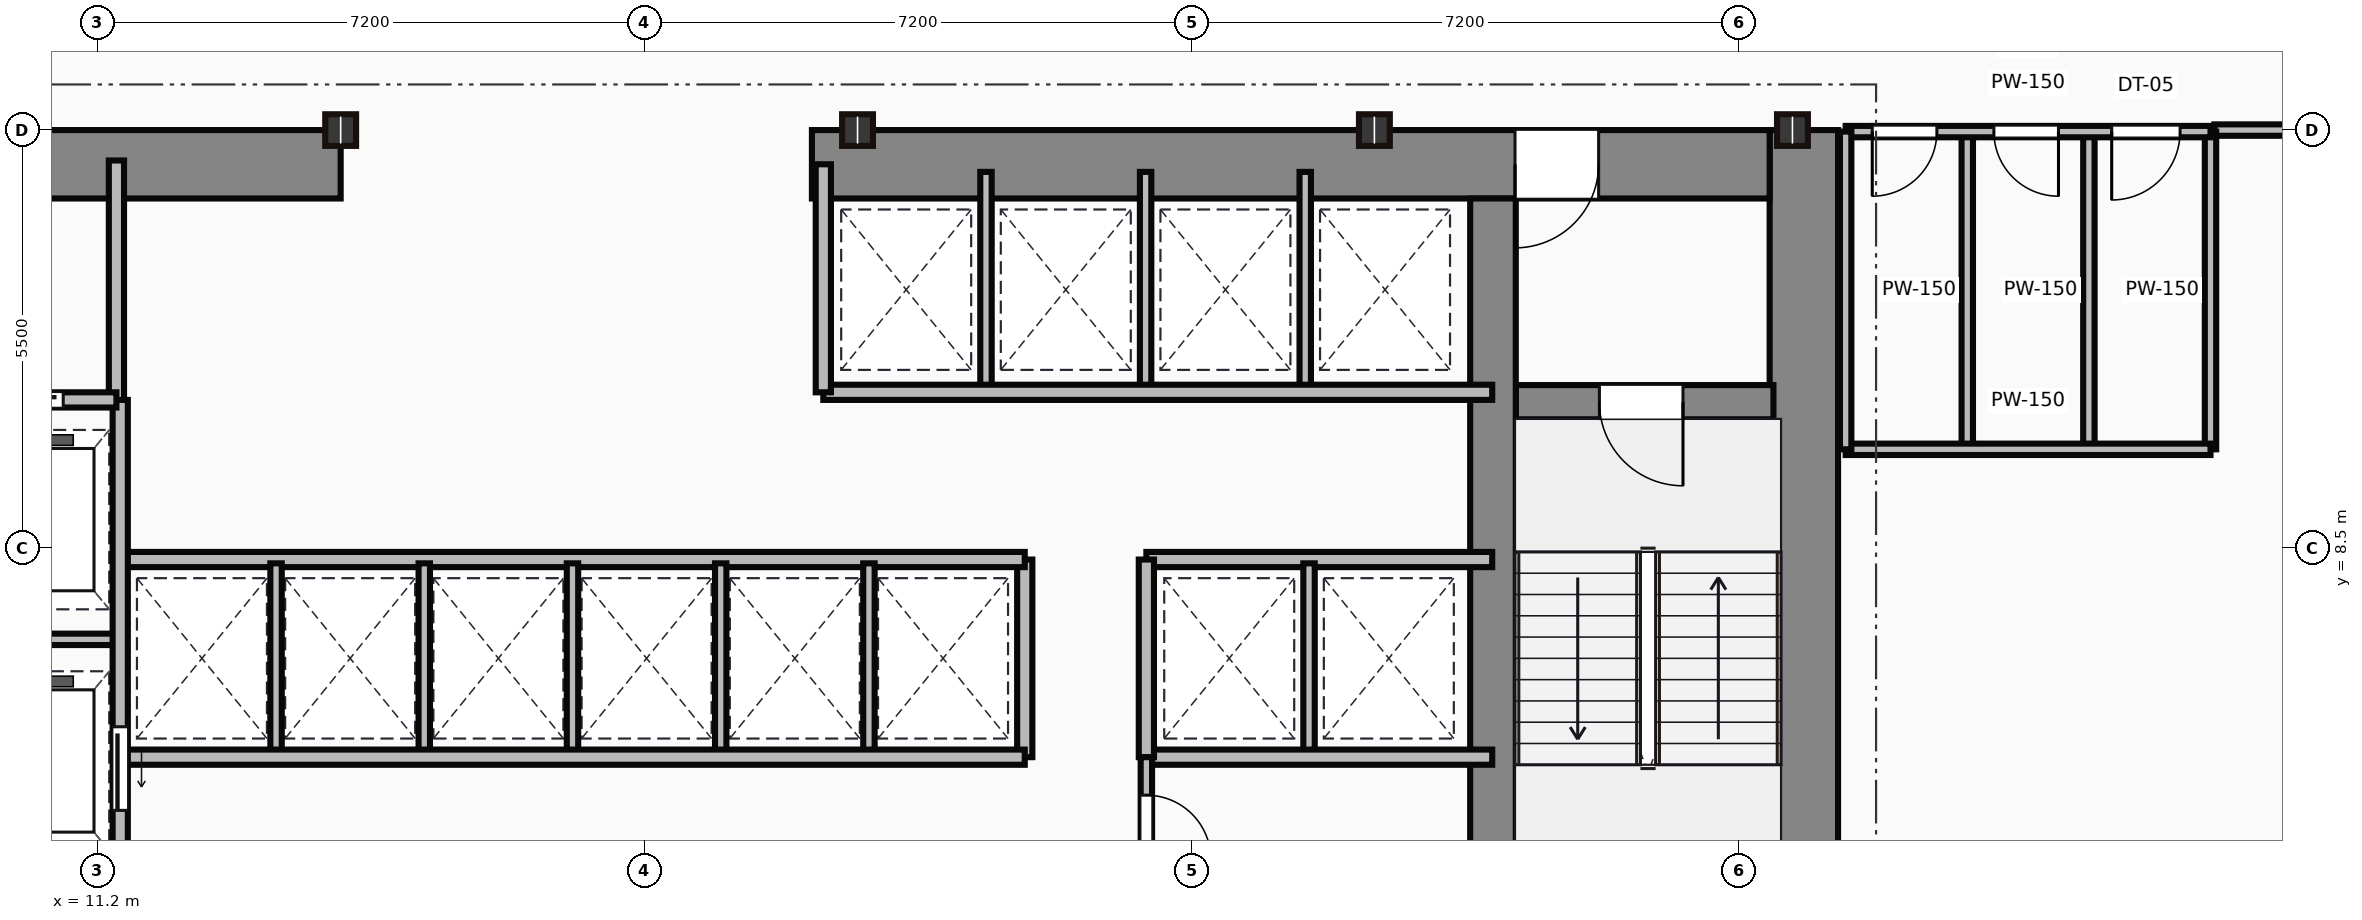
"""IFC4 building model, lengths in metres.
Left out: names, types, materials, properties, quantities, classifications, styles, units other than length and angle.
Written with IfcOpenShell. Run it as: python <this file> out.ifc"""

import sys

from ifc_helpers import new_model, si_unit, direction, frame, frame_2d, origin, origin_2d, place, context, subcontext, project, spatial, rectangle, i_section, extrude, source, transform, mapped, element, fill, save


model = new_model("IFC4")
c1 = context("Model", 3, precision=1e-05, world=origin(), true_north=direction((0.0, 1.0)))
c2 = subcontext(c1, "Body", "Model", "MODEL_VIEW")
j1 = project(units=[si_unit("LENGTHUNIT", "METRE"), si_unit("PLANEANGLEUNIT", "RADIAN")], contexts=[c1])
p1 = place(None, origin())
s1 = spatial("IfcSite", under=j1, at=p1, CompositionType="ELEMENT")
p2 = place(p1, origin())
s2 = spatial("IfcBuilding", under=s1, at=p2, CompositionType="ELEMENT")
p3 = place(p2, frame((0.0, 0.0, 54.4)))
s3 = spatial("IfcBuildingStorey", under=s2, at=p3, CompositionType="ELEMENT", Elevation=54.4)
m1 = source(origin(), c2, "Body", "SweptSolid", [
    extrude(rectangle(XDim=13.1, YDim=0.9, at=frame_2d((6.55, 0.0))), origin(), (0.0, 0.0, 1.0), 3.65),
])
p4 = place(p3, frame((33.65, 0.9, 0.0), z_axis=(0.0, 0.0, 1.0), x_axis=(0.0, 1.0, 0.0)))
e1 = element("IfcWall", 1, at=p4, inside=s3, PredefinedType="SHEAR", context=c2, shape_type="MappedRepresentation", body=[
    mapped(m1, transform((0.0, 0.0, 0.0))),
])
m2 = source(origin(), c2, "Body", "SweptSolid", [
    extrude(rectangle(XDim=9.1, YDim=0.9, at=frame_2d((4.55, 0.0))), origin(), (0.0, 0.0, 1.0), 3.65),
])
p5 = place(p3, frame((5.3, 13.55, 0.0), z_axis=(0.0, 0.0, 1.0), x_axis=(1.0, 0.0, 0.0)))
e2 = element("IfcWall", 2, at=p5, inside=s3, PredefinedType="SHEAR", context=c2, shape_type="MappedRepresentation", body=[
    mapped(m2, transform((0.0, 0.0, 0.0))),
])
p6 = place(p5, frame((4.1, 0.0, 0.0)))
e3 = element("IfcOpeningElement", 3, at=p6, cuts=e2, PredefinedType="OPENING", context=c2, shape_type="SweptSolid", body=[
    extrude(rectangle(XDim=1.1, YDim=2.15, at=frame_2d((0.55, 1.075))), frame((0.0, 0.46, 0.0), z_axis=(0.0, -1.0, 0.0), x_axis=(1.0, 0.0, 0.0)), (0.0, 0.0, 1.0), 0.92),
])
m3 = source(origin(), c2, "Body", "SweptSolid", [
    extrude(rectangle(XDim=12.6, YDim=0.9, at=frame_2d((6.3, 0.0))), origin(), (0.0, 0.0, 1.0), 3.65),
])
p7 = place(p3, frame((20.6, 13.55, 0.0), z_axis=(0.0, 0.0, 1.0), x_axis=(1.0, 0.0, 0.0)))
e4 = element("IfcWall", 4, at=p7, inside=s3, PredefinedType="SHEAR", context=c2, shape_type="MappedRepresentation", body=[
    mapped(m3, transform((0.0, 0.0, 0.0))),
])
p8 = place(p7, frame((9.25, 0.0, 0.0)))
e5 = element("IfcOpeningElement", 5, at=p8, cuts=e4, PredefinedType="OPENING", context=c2, shape_type="SweptSolid", body=[
    extrude(rectangle(XDim=1.1, YDim=2.15, at=frame_2d((0.55, 1.075))), frame((0.0, 0.46, 0.0), z_axis=(0.0, -1.0, 0.0), x_axis=(1.0, 0.0, 0.0)), (0.0, 0.0, 1.0), 0.92),
])
m4 = source(origin(), c2, "Body", "SweptSolid", [
    extrude(rectangle(XDim=12.2, YDim=0.6, at=frame_2d((6.1, 0.0))), origin(), (0.0, 0.0, 1.0), 3.65),
])
p9 = place(p3, frame((29.56, 0.9, 0.0), z_axis=(0.0, 0.0, 1.0), x_axis=(0.0, 1.0, 0.0)))
e6 = element("IfcWall", 6, at=p9, inside=s3, PredefinedType="SHEAR", context=c2, shape_type="MappedRepresentation", body=[
    mapped(m4, transform((0.0, 0.0, 0.0))),
])
m5 = source(origin(), c2, "Body", "SweptSolid", [
    extrude(rectangle(XDim=3.39, YDim=0.45, at=frame_2d((1.695, 0.0))), origin(), (0.0, 0.0, 1.0), 3.65),
])
p10 = place(p3, frame((29.86, 10.42, 0.0), z_axis=(0.0, 0.0, 1.0), x_axis=(1.0, 0.0, 0.0)))
e7 = element("IfcWall", 7, at=p10, inside=s3, PredefinedType="SHEAR", context=c2, shape_type="MappedRepresentation", body=[
    mapped(m5, transform((0.0, 0.0, 0.0))),
])
p11 = place(p10, frame((1.1, 0.0, 0.0)))
e8 = element("IfcOpeningElement", 8, at=p11, cuts=e7, PredefinedType="OPENING", context=c2, shape_type="SweptSolid", body=[
    extrude(rectangle(XDim=1.1, YDim=2.15, at=frame_2d((0.55, 1.075))), frame((0.0, 0.235, 0.0), z_axis=(0.0, -1.0, 0.0), x_axis=(1.0, 0.0, 0.0)), (0.0, 0.0, 1.0), 0.47),
])
m6 = source(origin(), c2, "Body", "SweptSolid", [
    extrude(i_section(OverallWidth=0.406, OverallDepth=0.416, WebThickness=0.03, FlangeThickness=0.048, at=origin_2d()), origin(), (0.0, 0.0, 1.0), 3.65),
])
for number, where, z_axis, x_axis in (
    (9, (14.4, 14.0, 0.0), (0.0, 0.0, 1.0), (1.0, 0.0, 0.0)),
    (10, (21.2, 14.0, 0.0), (0.0, 0.0, 1.0), (1.0, 0.0, 0.0)),
    (11, (28.0, 14.0, 0.0), (0.0, 0.0, 1.0), (1.0, 0.0, 0.0)),
    (12, (33.5, 14.0, 0.0), (0.0, 0.0, 1.0), (1.0, 0.0, 0.0)),
):
    element("IfcColumn", number, at=place(p3, frame(where, z_axis=z_axis, x_axis=x_axis)), inside=s3, PredefinedType="COLUMN", context=c2, shape_type="MappedRepresentation", body=[
        mapped(m6, transform((0.0, 0.0, 0.0))),
    ])
m7 = source(origin(), c2, "Body", "SweptSolid", [
    extrude(rectangle(XDim=3.18, YDim=0.2, at=frame_2d((1.59, 0.0))), origin(), (0.0, 0.0, 1.0), 3.4),
])
p12 = place(p3, frame((11.45, 10.42, 0.0), z_axis=(0.0, 0.0, 1.0), x_axis=(0.0, 1.0, 0.0)))
e13 = element("IfcWall", 13, at=p12, inside=s3, PredefinedType="PARTITIONING", context=c2, shape_type="MappedRepresentation", body=[
    mapped(m7, transform((0.0, 0.0, 0.0))),
])
m8 = source(origin(), c2, "Body", "SweptSolid", [
    extrude(rectangle(XDim=2.35, YDim=0.2, at=frame_2d((1.175, 0.0))), origin(), (0.0, 0.0, 1.0), 3.4),
])
p13 = place(p3, frame((9.1, 10.45, 0.0), z_axis=(0.0, 0.0, 1.0), x_axis=(1.0, 0.0, 0.0)))
e14 = element("IfcWall", 14, at=p13, inside=s3, PredefinedType="PARTITIONING", context=c2, shape_type="MappedRepresentation", body=[
    mapped(m8, transform((0.0, 0.0, 0.0))),
])
p14 = place(p13, frame((0.55, 0.0, 0.0)))
e15 = element("IfcOpeningElement", 15, at=p14, cuts=e14, PredefinedType="OPENING", context=c2, shape_type="SweptSolid", body=[
    extrude(rectangle(XDim=1.1, YDim=2.15, at=frame_2d((0.55, 1.075))), frame((0.0, 0.11, 0.0), z_axis=(0.0, -1.0, 0.0), x_axis=(1.0, 0.0, 0.0)), (0.0, 0.0, 1.0), 0.22),
])
m9 = source(origin(), c2, "Body", "SweptSolid", [
    extrude(rectangle(XDim=9.6, YDim=0.2, at=frame_2d((4.8, 0.0))), origin(), (0.0, 0.0, 1.0), 3.4),
])
p15 = place(p3, frame((11.5, 0.85, 0.0), z_axis=(0.0, 0.0, 1.0), x_axis=(0.0, 1.0, 0.0)))
e16 = element("IfcWall", 16, at=p15, inside=s3, PredefinedType="PARTITIONING", context=c2, shape_type="MappedRepresentation", body=[
    mapped(m9, transform((0.0, 0.0, 0.0))),
])
p16 = place(p15, frame((4.2, 0.0, 0.0)))
e17 = element("IfcOpeningElement", 17, at=p16, cuts=e16, PredefinedType="OPENING", context=c2, shape_type="SweptSolid", body=[
    extrude(rectangle(XDim=1.1, YDim=2.15, at=frame_2d((0.55, 1.075))), frame((0.0, 0.11, 0.0), z_axis=(0.0, -1.0, 0.0), x_axis=(1.0, 0.0, 0.0)), (0.0, 0.0, 1.0), 0.22),
])
p17 = place(p15, frame((0.9, 0.0, 0.0)))
e18 = element("IfcOpeningElement", 18, at=p17, cuts=e16, PredefinedType="OPENING", context=c2, shape_type="SweptSolid", body=[
    extrude(rectangle(XDim=1.2, YDim=2.15, at=frame_2d((0.6, 1.075))), frame((0.0, 0.11, 0.0), z_axis=(0.0, -1.0, 0.0), x_axis=(1.0, 0.0, 0.0)), (0.0, 0.0, 1.0), 0.22),
])
m10 = source(origin(), c2, "Body", "SweptSolid", [
    extrude(rectangle(XDim=2.4, YDim=0.15, at=frame_2d((1.2, 0.0))), origin(), (0.0, 0.0, 1.0), 3.4),
])
p18 = place(p3, frame((9.1, 7.3, 0.0), z_axis=(0.0, 0.0, 1.0), x_axis=(1.0, 0.0, 0.0)))
e19 = element("IfcWall", 19, at=p18, inside=s3, PredefinedType="PARTITIONING", context=c2, shape_type="MappedRepresentation", body=[
    mapped(m10, transform((0.0, 0.0, 0.0))),
])
m11 = source(origin(), c2, "Body", "SweptSolid", [
    extrude(rectangle(XDim=11.85, YDim=0.2, at=frame_2d((5.925, 0.0))), origin(), (0.0, 0.0, 1.0), 3.4),
])
for number, where, z_axis, x_axis in (
    (20, (11.55, 5.75, 0.0), (0.0, 0.0, 1.0), (1.0, 0.0, 0.0)),
    (21, (11.55, 8.35, 0.0), (0.0, 0.0, 1.0), (1.0, 0.0, 0.0)),
):
    element("IfcWall", number, at=place(p3, frame(where, z_axis=z_axis, x_axis=x_axis)), inside=s3, PredefinedType="PARTITIONING", context=c2, shape_type="MappedRepresentation", body=[
        mapped(m11, transform((0.0, 0.0, 0.0))),
    ])
m12 = source(origin(), c2, "Body", "SweptSolid", [
    extrude(rectangle(XDim=2.6, YDim=0.2, at=frame_2d((1.3, 0.0))), origin(), (0.0, 0.0, 1.0), 3.4),
])
p19 = place(p3, frame((23.4, 5.75, 0.0), z_axis=(0.0, 0.0, 1.0), x_axis=(0.0, 1.0, 0.0)))
e22 = element("IfcWall", 22, at=p19, inside=s3, PredefinedType="PARTITIONING", context=c2, shape_type="MappedRepresentation", body=[
    mapped(m12, transform((0.0, 0.0, 0.0))),
])
m13 = source(origin(), c2, "Body", "SweptSolid", [
    extrude(rectangle(XDim=2.5, YDim=0.15, at=frame_2d((1.25, 0.0))), origin(), (0.0, 0.0, 1.0), 3.4),
])
for number, where, z_axis, x_axis in (
    (23, (13.55, 5.8, 0.0), (0.0, 0.0, 1.0), (0.0, 1.0, 0.0)),
    (24, (15.5, 5.8, 0.0), (0.0, 0.0, 1.0), (0.0, 1.0, 0.0)),
    (25, (17.45, 5.8, 0.0), (0.0, 0.0, 1.0), (0.0, 1.0, 0.0)),
    (26, (19.4, 5.8, 0.0), (0.0, 0.0, 1.0), (0.0, 1.0, 0.0)),
    (27, (21.35, 5.8, 0.0), (0.0, 0.0, 1.0), (0.0, 1.0, 0.0)),
):
    element("IfcWall", number, at=place(p3, frame(where, z_axis=z_axis, x_axis=x_axis)), inside=s3, PredefinedType="PARTITIONING", context=c2, shape_type="MappedRepresentation", body=[
        mapped(m13, transform((0.0, 0.0, 0.0))),
    ])
m14 = source(origin(), c2, "Body", "SweptSolid", [
    extrude(rectangle(XDim=8.8, YDim=0.2, at=frame_2d((4.4, 0.0))), origin(), (0.0, 0.0, 1.0), 3.4),
])
p20 = place(p3, frame((20.75, 10.55, 0.0), z_axis=(0.0, 0.0, 1.0), x_axis=(1.0, 0.0, 0.0)))
e28 = element("IfcWall", 28, at=p20, inside=s3, PredefinedType="PARTITIONING", context=c2, shape_type="MappedRepresentation", body=[
    mapped(m14, transform((0.0, 0.0, 0.0))),
])
m15 = source(origin(), c2, "Body", "SweptSolid", [
    extrude(rectangle(XDim=3.0, YDim=0.2, at=frame_2d((1.5, 0.0))), origin(), (0.0, 0.0, 1.0), 3.4),
])
p21 = place(p3, frame((20.75, 10.55, 0.0), z_axis=(0.0, 0.0, 1.0), x_axis=(0.0, 1.0, 0.0)))
e29 = element("IfcWall", 29, at=p21, inside=s3, PredefinedType="PARTITIONING", context=c2, shape_type="MappedRepresentation", body=[
    mapped(m15, transform((0.0, 0.0, 0.0))),
])
m16 = source(origin(), c2, "Body", "SweptSolid", [
    extrude(rectangle(XDim=2.85, YDim=0.15, at=frame_2d((1.425, 0.0))), origin(), (0.0, 0.0, 1.0), 3.4),
])
for number, where, z_axis, x_axis in (
    (30, (22.89, 10.6, 0.0), (0.0, 0.0, 1.0), (0.0, 1.0, 0.0)),
    (31, (24.99, 10.6, 0.0), (0.0, 0.0, 1.0), (0.0, 1.0, 0.0)),
    (32, (27.09, 10.6, 0.0), (0.0, 0.0, 1.0), (0.0, 1.0, 0.0)),
):
    element("IfcWall", number, at=place(p3, frame(where, z_axis=z_axis, x_axis=x_axis)), inside=s3, PredefinedType="PARTITIONING", context=c2, shape_type="MappedRepresentation", body=[
        mapped(m16, transform((0.0, 0.0, 0.0))),
    ])
m17 = source(origin(), c2, "Body", "SweptSolid", [
    extrude(rectangle(XDim=4.55, YDim=0.2, at=frame_2d((2.275, 0.0))), origin(), (0.0, 0.0, 1.0), 3.4),
])
for number, where, z_axis, x_axis in (
    (33, (25.0, 8.35, 0.0), (0.0, 0.0, 1.0), (1.0, 0.0, 0.0)),
    (34, (25.0, 5.75, 0.0), (0.0, 0.0, 1.0), (1.0, 0.0, 0.0)),
):
    element("IfcWall", number, at=place(p3, frame(where, z_axis=z_axis, x_axis=x_axis)), inside=s3, PredefinedType="PARTITIONING", context=c2, shape_type="MappedRepresentation", body=[
        mapped(m17, transform((0.0, 0.0, 0.0))),
    ])
p22 = place(p3, frame((25.0, 5.75, 0.0), z_axis=(0.0, 0.0, 1.0), x_axis=(0.0, 1.0, 0.0)))
e35 = element("IfcWall", 35, at=p22, inside=s3, PredefinedType="PARTITIONING", context=c2, shape_type="MappedRepresentation", body=[
    mapped(m12, transform((0.0, 0.0, 0.0))),
])
p23 = place(p3, frame((27.14, 5.8, 0.0), z_axis=(0.0, 0.0, 1.0), x_axis=(0.0, 1.0, 0.0)))
e36 = element("IfcWall", 36, at=p23, inside=s3, PredefinedType="PARTITIONING", context=c2, shape_type="MappedRepresentation", body=[
    mapped(m13, transform((0.0, 0.0, 0.0))),
])
m18 = source(origin(), c2, "Body", "SweptSolid", [
    extrude(rectangle(XDim=4.9, YDim=0.15, at=frame_2d((2.45, 0.0))), origin(), (0.0, 0.0, 1.0), 3.4),
])
p24 = place(p3, frame((25.0, 0.85, 0.0), z_axis=(0.0, 0.0, 1.0), x_axis=(0.0, 1.0, 0.0)))
e37 = element("IfcWall", 37, at=p24, inside=s3, PredefinedType="PARTITIONING", context=c2, shape_type="MappedRepresentation", body=[
    mapped(m18, transform((0.0, 0.0, 0.0))),
])
p25 = place(p24, frame((1.85, 0.0, 0.0)))
e38 = element("IfcOpeningElement", 38, at=p25, cuts=e37, PredefinedType="OPENING", context=c2, shape_type="SweptSolid", body=[
    extrude(rectangle(XDim=0.95, YDim=2.15, at=frame_2d((0.475, 1.075))), frame((0.0, 0.085, 0.0), z_axis=(0.0, -1.0, 0.0), x_axis=(1.0, 0.0, 0.0)), (0.0, 0.0, 1.0), 0.17),
])
p26 = place(p24, frame((3.55, 0.0, 0.0)))
e39 = element("IfcOpeningElement", 39, at=p26, cuts=e37, PredefinedType="OPENING", context=c2, shape_type="SweptSolid", body=[
    extrude(rectangle(XDim=0.85, YDim=2.15, at=frame_2d((0.425, 1.075))), frame((0.0, 0.085, 0.0), z_axis=(0.0, -1.0, 0.0), x_axis=(1.0, 0.0, 0.0)), (0.0, 0.0, 1.0), 0.17),
])
m19 = source(origin(), c2, "Body", "SweptSolid", [
    extrude(rectangle(XDim=4.8, YDim=0.15, at=frame_2d((2.4, 0.0))), origin(), (0.0, 0.0, 1.0), 2.625),
])
p27 = place(p3, frame((34.2, 13.98, 0.0), z_axis=(0.0, 0.0, 1.0), x_axis=(1.0, 0.0, 0.0)))
e40 = element("IfcWall", 40, at=p27, inside=s3, PredefinedType="PARTITIONING", context=c2, shape_type="MappedRepresentation", body=[
    mapped(m19, transform((0.0, 0.0, 0.0))),
])
p28 = place(p27, frame((0.35, 0.0, 0.0)))
e41 = element("IfcOpeningElement", 41, at=p28, cuts=e40, PredefinedType="OPENING", context=c2, shape_type="SweptSolid", body=[
    extrude(rectangle(XDim=0.85, YDim=2.1, at=frame_2d((0.425, 1.05))), frame((0.0, 0.085, 0.0), z_axis=(0.0, -1.0, 0.0), x_axis=(1.0, 0.0, 0.0)), (0.0, 0.0, 1.0), 0.17),
])
p29 = place(p27, frame((1.95, 0.0, 0.0)))
e42 = element("IfcOpeningElement", 42, at=p29, cuts=e40, PredefinedType="OPENING", context=c2, shape_type="SweptSolid", body=[
    extrude(rectangle(XDim=0.85, YDim=2.1, at=frame_2d((0.425, 1.05))), frame((0.0, 0.085, 0.0), z_axis=(0.0, -1.0, 0.0), x_axis=(1.0, 0.0, 0.0)), (0.0, 0.0, 1.0), 0.17),
])
p30 = place(p27, frame((3.5, 0.0, 0.0)))
e43 = element("IfcOpeningElement", 43, at=p30, cuts=e40, PredefinedType="OPENING", context=c2, shape_type="SweptSolid", body=[
    extrude(rectangle(XDim=0.9, YDim=2.1, at=frame_2d((0.45, 1.05))), frame((0.0, 0.085, 0.0), z_axis=(0.0, -1.0, 0.0), x_axis=(1.0, 0.0, 0.0)), (0.0, 0.0, 1.0), 0.17),
])
m20 = source(origin(), c2, "Body", "SweptSolid", [
    extrude(rectangle(XDim=4.8, YDim=0.15, at=frame_2d((2.4, 0.0))), origin(), (0.0, 0.0, 1.0), 3.4),
])
p31 = place(p3, frame((34.2, 9.8, 0.0), z_axis=(0.0, 0.0, 1.0), x_axis=(1.0, 0.0, 0.0)))
e44 = element("IfcWall", 44, at=p31, inside=s3, PredefinedType="PARTITIONING", context=c2, shape_type="MappedRepresentation", body=[
    mapped(m20, transform((0.0, 0.0, 0.0))),
])
m21 = source(origin(), c2, "Body", "SweptSolid", [
    extrude(rectangle(XDim=4.18, YDim=0.15, at=frame_2d((2.09, 0.0))), origin(), (0.0, 0.0, 1.0), 3.4),
])
for number, where, z_axis, x_axis in (
    (45, (39.0, 9.8, 0.0), (0.0, 0.0, 1.0), (0.0, 1.0, 0.0)),
    (46, (34.2, 9.8, 0.0), (0.0, 0.0, 1.0), (0.0, 1.0, 0.0)),
    (47, (35.8, 9.8, 0.0), (0.0, 0.0, 1.0), (0.0, 1.0, 0.0)),
    (48, (37.4, 9.8, 0.0), (0.0, 0.0, 1.0), (0.0, 1.0, 0.0)),
):
    element("IfcWall", number, at=place(p3, frame(where, z_axis=z_axis, x_axis=x_axis)), inside=s3, PredefinedType="PARTITIONING", context=c2, shape_type="MappedRepresentation", body=[
        mapped(m21, transform((0.0, 0.0, 0.0))),
    ])
m22 = source(origin(), c2, "Body", "SweptSolid", [
    extrude(rectangle(XDim=7.75, YDim=0.15, at=frame_2d((3.875, 0.0))), origin(), (0.0, 0.0, 1.0), 2.625),
])
p32 = place(p3, frame((46.8, 14.0, 0.0), z_axis=(0.0, 0.0, 1.0), x_axis=(-1.0, 0.0, 0.0)))
e49 = element("IfcWall", 49, at=p32, inside=s3, PredefinedType="PARTITIONING", context=c2, shape_type="MappedRepresentation", body=[
    mapped(m22, transform((0.0, 0.0, 0.0))),
])
m23 = source(origin(), c2, "Body", "SweptSolid", [
    extrude(rectangle(XDim=1.1, YDim=2.15, at=frame_2d((0.55, 1.075))), frame((0.0, 0.025, 0.0), z_axis=(0.0, -1.0, 0.0), x_axis=(1.0, 0.0, 0.0)), (0.0, 0.0, 1.0), 0.05),
])
p33 = place(p11, frame((1.1, 0.0, 0.0), z_axis=(0.0, 0.0, 1.0), x_axis=(-1.0, 0.0, 0.0)))
e50 = element("IfcDoor", 50, at=p33, inside=s3, OperationType="SINGLE_SWING_RIGHT", PredefinedType="DOOR", context=c2, shape_type="MappedRepresentation", body=[
    mapped(m23, transform((0.0, 0.0, 0.0))),
])
fill(e8, e50)
p34 = place(p8, origin())
e51 = element("IfcDoor", 51, at=p34, inside=s3, OperationType="SINGLE_SWING_LEFT", PredefinedType="DOOR", context=c2, shape_type="MappedRepresentation", body=[
    mapped(m23, transform((0.0, 0.0, 0.0))),
])
fill(e5, e51)
p35 = place(p14, origin())
e52 = element("IfcDoor", 52, at=p35, inside=s3, OperationType="SLIDING_TO_LEFT", PredefinedType="DOOR", context=c2, shape_type="MappedRepresentation", body=[
    mapped(m23, transform((0.0, 0.0, 0.0))),
])
fill(e15, e52)
p36 = place(p16, frame((1.1, 0.0, 0.0), z_axis=(0.0, 0.0, 1.0), x_axis=(-1.0, 0.0, 0.0)))
e53 = element("IfcDoor", 53, at=p36, inside=s3, OperationType="SLIDING_TO_LEFT", PredefinedType="DOOR", context=c2, shape_type="MappedRepresentation", body=[
    mapped(m23, transform((0.0, 0.0, 0.0))),
])
fill(e17, e53)
m24 = source(origin(), c2, "Body", "SweptSolid", [
    extrude(rectangle(XDim=0.85, YDim=2.15, at=frame_2d((0.425, 1.075))), frame((0.0, 0.025, 0.0), z_axis=(0.0, -1.0, 0.0), x_axis=(1.0, 0.0, 0.0)), (0.0, 0.0, 1.0), 0.05),
])
p37 = place(p26, origin())
e54 = element("IfcDoor", 54, at=p37, inside=s3, OperationType="SINGLE_SWING_LEFT", PredefinedType="DOOR", context=c2, shape_type="MappedRepresentation", body=[
    mapped(m24, transform((0.0, 0.0, 0.0))),
])
fill(e39, e54)
m25 = source(origin(), c2, "Body", "SweptSolid", [
    extrude(rectangle(XDim=0.85, YDim=2.1, at=frame_2d((0.425, 1.05))), frame((0.0, 0.025, 0.0), z_axis=(0.0, -1.0, 0.0), x_axis=(1.0, 0.0, 0.0)), (0.0, 0.0, 1.0), 0.05),
])
p38 = place(p28, frame((0.85, 0.0, 0.0), z_axis=(0.0, 0.0, 1.0), x_axis=(-1.0, 0.0, 0.0)))
e55 = element("IfcDoor", 55, at=p38, inside=s3, OperationType="SINGLE_SWING_LEFT", PredefinedType="DOOR", context=c2, shape_type="MappedRepresentation", body=[
    mapped(m25, transform((0.0, 0.0, 0.0))),
])
fill(e41, e55)
p39 = place(p29, frame((0.85, 0.0, 0.0), z_axis=(0.0, 0.0, 1.0), x_axis=(-1.0, 0.0, 0.0)))
e56 = element("IfcDoor", 56, at=p39, inside=s3, OperationType="SINGLE_SWING_RIGHT", PredefinedType="DOOR", context=c2, shape_type="MappedRepresentation", body=[
    mapped(m25, transform((0.0, 0.0, 0.0))),
])
fill(e42, e56)
m26 = source(origin(), c2, "Body", "SweptSolid", [
    extrude(rectangle(XDim=0.9, YDim=2.1, at=frame_2d((0.45, 1.05))), frame((0.0, 0.025, 0.0), z_axis=(0.0, -1.0, 0.0), x_axis=(1.0, 0.0, 0.0)), (0.0, 0.0, 1.0), 0.05),
])
p40 = place(p30, frame((0.9, 0.0, 0.0), z_axis=(0.0, 0.0, 1.0), x_axis=(-1.0, 0.0, 0.0)))
e57 = element("IfcDoor", 57, at=p40, inside=s3, OperationType="SINGLE_SWING_LEFT", PredefinedType="DOOR", context=c2, shape_type="MappedRepresentation", body=[
    mapped(m26, transform((0.0, 0.0, 0.0))),
])
fill(e43, e57)
save(model, sys.argv[1])
